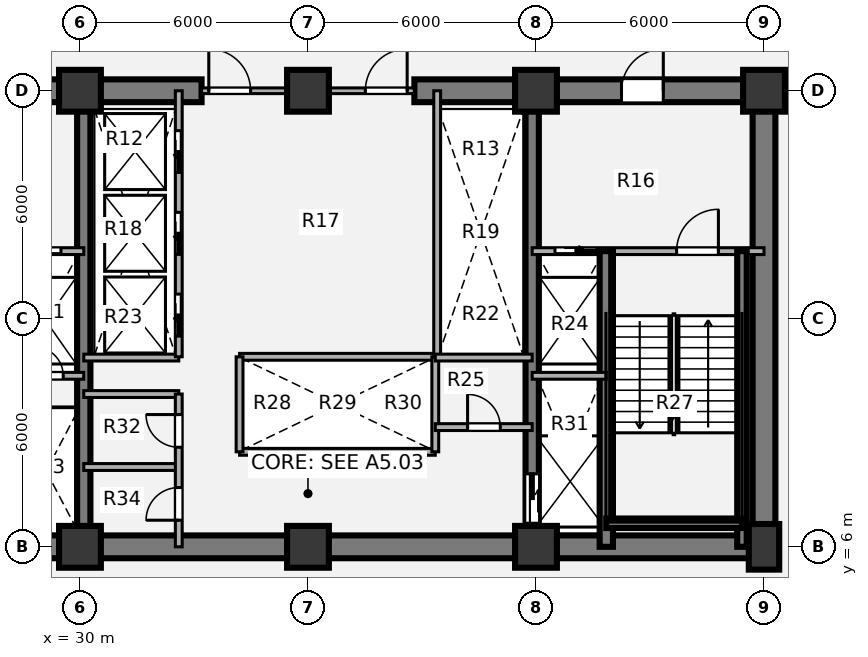
"""IFC4 building model, lengths in metres.
Left out: names, types, materials, properties, quantities, classifications, styles, units other than length and angle.
Written with IfcOpenShell. Run it as: python <this file> out.ifc"""

import sys

from ifc_helpers import new_model, si_unit, direction, frame, frame_2d, origin, origin_2d, place, context, subcontext, project, spatial, rectangle, extrude, source, transform, mapped, element, fill, save


model = new_model("IFC4")
c1 = context("Model", 3, precision=1e-05, world=origin(), true_north=direction((0.0, 1.0)))
c2 = subcontext(c1, "Body", "Model", "MODEL_VIEW")
j1 = project(units=[si_unit("LENGTHUNIT", "METRE"), si_unit("PLANEANGLEUNIT", "RADIAN")], contexts=[c1])
p1 = place(None, origin())
s1 = spatial("IfcSite", under=j1, at=p1, CompositionType="ELEMENT")
p2 = place(p1, origin())
s2 = spatial("IfcBuilding", under=s1, at=p2, CompositionType="ELEMENT")
p3 = place(p2, frame((0.0, 0.0, 22.68)))
s3 = spatial("IfcBuildingStorey", under=s2, at=p3, CompositionType="ELEMENT", Elevation=22.68)
m1 = source(origin(), c2, "Body", "SweptSolid", [
    extrude(rectangle(XDim=1.1, YDim=1.1, at=origin_2d()), origin(), (0.0, 0.0, 1.0), 4.32),
])
for number, where, z_axis, x_axis in (
    (1, (30.0, 6.0, 0.0), (0.0, 0.0, 1.0), (1.0, 0.0, 0.0)),
    (2, (36.0, 6.0, 0.0), (0.0, 0.0, 1.0), (1.0, 0.0, 0.0)),
    (3, (42.0, 6.0, 0.0), (0.0, 0.0, 1.0), (1.0, 0.0, 0.0)),
):
    element("IfcColumn", number, at=place(p3, frame(where, z_axis=z_axis, x_axis=x_axis)), inside=s3, PredefinedType="COLUMN", context=c2, shape_type="MappedRepresentation", body=[
        mapped(m1, transform((0.0, 0.0, 0.0), x_axis=(1.0, 0.0, 0.0), y_axis=(0.0, 1.0, 0.0), z_axis=(0.0, 0.0, 1.0), scale=1.0)),
    ])
m2 = source(origin(), c2, "Body", "SweptSolid", [
    extrude(rectangle(XDim=0.8, YDim=1.2, at=origin_2d()), origin(), (0.0, 0.0, 1.0), 4.32),
])
p4 = place(p3, frame((48.0, 6.0, 0.0), z_axis=(0.0, 0.0, 1.0), x_axis=(1.0, 0.0, 0.0)))
e4 = element("IfcColumn", 4, at=p4, inside=s3, PredefinedType="COLUMN", context=c2, shape_type="MappedRepresentation", body=[
    mapped(m2, transform((0.0, 0.0, 0.0), x_axis=(1.0, 0.0, 0.0), y_axis=(0.0, 1.0, 0.0), z_axis=(0.0, 0.0, 1.0), scale=1.0)),
])
for number, where, z_axis, x_axis in (
    (5, (30.0, 18.0, 0.0), (0.0, 0.0, 1.0), (1.0, 0.0, 0.0)),
    (6, (36.0, 18.0, 0.0), (0.0, 0.0, 1.0), (1.0, 0.0, 0.0)),
    (7, (42.0, 18.0, 0.0), (0.0, 0.0, 1.0), (1.0, 0.0, 0.0)),
    (8, (48.0, 18.0, 0.0), (0.0, 0.0, 1.0), (1.0, 0.0, 0.0)),
):
    element("IfcColumn", number, at=place(p3, frame(where, z_axis=z_axis, x_axis=x_axis)), inside=s3, PredefinedType="COLUMN", context=c2, shape_type="MappedRepresentation", body=[
        mapped(m1, transform((0.0, 0.0, 0.0), x_axis=(1.0, 0.0, 0.0), y_axis=(0.0, 1.0, 0.0), z_axis=(0.0, 0.0, 1.0), scale=1.0)),
    ])
p5 = place(p3, frame((48.3, 6.0, 0.0), z_axis=(0.0, 0.0, 1.0), x_axis=(-1.0, 0.0, 0.0)))
e9 = element("IfcWall", 9, at=p5, inside=s3, PredefinedType="SHEAR", context=c2, shape_type="SweptSolid", body=[
    extrude(rectangle(XDim=24.6, YDim=0.6, at=frame_2d((12.3, 0.0))), origin(), (0.0, 0.0, 1.0), 4.32),
])
p6 = place(p3, frame((48.0, 18.0, 0.0), z_axis=(0.0, 0.0, 1.0), x_axis=(0.0, -1.0, 0.0)))
e10 = element("IfcWall", 10, at=p6, inside=s3, PredefinedType="SHEAR", context=c2, shape_type="SweptSolid", body=[
    extrude(rectangle(XDim=12.0, YDim=0.6, at=frame_2d((6.0, 0.0))), origin(), (0.0, 0.0, 1.0), 4.32),
])
p7 = place(p3, frame((23.7, 18.0, 0.0), z_axis=(0.0, 0.0, 1.0), x_axis=(1.0, 0.0, 0.0)))
e11 = element("IfcWall", 11, at=p7, inside=s3, PredefinedType="SHEAR", context=c2, shape_type="SweptSolid", body=[
    extrude(rectangle(XDim=9.5, YDim=0.6, at=frame_2d((4.75, 0.0))), origin(), (0.0, 0.0, 1.0), 4.32),
])
p8 = place(p7, frame((2.95, 0.0, 0.0)))
e12 = element("IfcOpeningElement", 12, at=p8, cuts=e11, PredefinedType="OPENING", context=c2, shape_type="SweptSolid", body=[
    extrude(rectangle(XDim=1.1, YDim=2.1, at=origin_2d()), frame((0.55, 0.31, 1.05), z_axis=(0.0, -1.0, 0.0), x_axis=(1.0, 0.0, 0.0)), (0.0, 0.0, 1.0), 0.62),
])
p9 = place(p3, frame((38.8, 18.0, 0.0), z_axis=(0.0, 0.0, 1.0), x_axis=(1.0, 0.0, 0.0)))
e13 = element("IfcWall", 13, at=p9, inside=s3, PredefinedType="SHEAR", context=c2, shape_type="SweptSolid", body=[
    extrude(rectangle(XDim=9.5, YDim=0.6, at=frame_2d((4.75, 0.0))), origin(), (0.0, 0.0, 1.0), 4.32),
])
p10 = place(p9, frame((5.45, 0.0, 0.0)))
e14 = element("IfcOpeningElement", 14, at=p10, cuts=e13, PredefinedType="OPENING", context=c2, shape_type="SweptSolid", body=[
    extrude(rectangle(XDim=1.1, YDim=2.1, at=origin_2d()), frame((0.55, 0.31, 1.05), z_axis=(0.0, -1.0, 0.0), x_axis=(1.0, 0.0, 0.0)), (0.0, 0.0, 1.0), 0.62),
])
p11 = place(p3, frame((30.1, 6.0, 0.0), z_axis=(0.0, 0.0, 1.0), x_axis=(0.0, 1.0, 0.0)))
e15 = element("IfcWall", 15, at=p11, inside=s3, PredefinedType="SHEAR", context=c2, shape_type="SweptSolid", body=[
    extrude(rectangle(XDim=12.0, YDim=0.35, at=frame_2d((6.0, 0.0))), origin(), (0.0, 0.0, 1.0), 4.32),
])
p12 = place(p3, frame((41.9, 18.0, 0.0), z_axis=(0.0, 0.0, 1.0), x_axis=(0.0, -1.0, 0.0)))
e16 = element("IfcWall", 16, at=p12, inside=s3, PredefinedType="SHEAR", context=c2, shape_type="SweptSolid", body=[
    extrude(rectangle(XDim=12.0, YDim=0.35, at=frame_2d((6.0, 0.0))), origin(), (0.0, 0.0, 1.0), 4.32),
])
p13 = place(p12, frame((10.08, 0.0, 0.0)))
e17 = element("IfcOpeningElement", 17, at=p13, cuts=e16, PredefinedType="OPENING", context=c2, shape_type="SweptSolid", body=[
    extrude(rectangle(XDim=1.3, YDim=2.1, at=origin_2d()), frame((0.65, 0.185, 1.05), z_axis=(0.0, -1.0, 0.0), x_axis=(1.0, 0.0, 0.0)), (0.0, 0.0, 1.0), 0.37),
])
for number, where, z_axis, x_axis in (
    (18, (34.2, 11.0, 0.0), (0.0, 0.0, 1.0), (1.0, 0.0, 0.0)),
    (19, (34.2, 8.5, 0.0), (0.0, 0.0, 1.0), (1.0, 0.0, 0.0)),
):
    element("IfcWall", number, at=place(p3, frame(where, z_axis=z_axis, x_axis=x_axis)), inside=s3, PredefinedType="PARTITIONING", context=c2, shape_type="SweptSolid", body=[
        extrude(rectangle(XDim=5.15, YDim=0.18, at=frame_2d((2.575, 0.0))), origin(), (0.0, 0.0, 1.0), 3.97),
    ])
for number, where, z_axis, x_axis in (
    (20, (34.2, 8.5, 0.0), (0.0, 0.0, 1.0), (0.0, 1.0, 0.0)),
    (21, (39.35, 8.5, 0.0), (0.0, 0.0, 1.0), (0.0, 1.0, 0.0)),
):
    element("IfcWall", number, at=place(p3, frame(where, z_axis=z_axis, x_axis=x_axis)), inside=s3, PredefinedType="PARTITIONING", context=c2, shape_type="SweptSolid", body=[
        extrude(rectangle(XDim=2.5, YDim=0.18, at=frame_2d((1.25, 0.0))), origin(), (0.0, 0.0, 1.0), 3.97),
    ])
p14 = place(p3, frame((39.4, 11.0, 0.0), z_axis=(0.0, 0.0, 1.0), x_axis=(0.0, 1.0, 0.0)))
e22 = element("IfcWall", 22, at=p14, inside=s3, PredefinedType="PARTITIONING", context=c2, shape_type="SweptSolid", body=[
    extrude(rectangle(XDim=7.0, YDim=0.18, at=frame_2d((3.5, 0.0))), origin(), (0.0, 0.0, 1.0), 3.97),
])
p15 = place(p3, frame((30.1, 10.98, 0.0), z_axis=(0.0, 0.0, 1.0), x_axis=(1.0, 0.0, 0.0)))
e23 = element("IfcWall", 23, at=p15, inside=s3, PredefinedType="PARTITIONING", context=c2, shape_type="SweptSolid", body=[
    extrude(rectangle(XDim=2.5, YDim=0.18, at=frame_2d((1.25, 0.0))), origin(), (0.0, 0.0, 1.0), 3.97),
])
p16 = place(p3, frame((39.35, 10.98, 0.0), z_axis=(0.0, 0.0, 1.0), x_axis=(1.0, 0.0, 0.0)))
e24 = element("IfcWall", 24, at=p16, inside=s3, PredefinedType="PARTITIONING", context=c2, shape_type="SweptSolid", body=[
    extrude(rectangle(XDim=2.55, YDim=0.18, at=frame_2d((1.275, 0.0))), origin(), (0.0, 0.0, 1.0), 3.97),
])
for number, where, z_axis, x_axis in (
    (25, (30.1, 8.1, 0.0), (0.0, 0.0, 1.0), (1.0, 0.0, 0.0)),
    (26, (30.1, 10.02, 0.0), (0.0, 0.0, 1.0), (1.0, 0.0, 0.0)),
):
    element("IfcWall", number, at=place(p3, frame(where, z_axis=z_axis, x_axis=x_axis)), inside=s3, PredefinedType="PARTITIONING", context=c2, shape_type="SweptSolid", body=[
        extrude(rectangle(XDim=2.5, YDim=0.18, at=frame_2d((1.25, 0.0))), origin(), (0.0, 0.0, 1.0), 3.97),
    ])
p17 = place(p3, frame((32.6, 6.0, 0.0), z_axis=(0.0, 0.0, 1.0), x_axis=(0.0, 1.0, 0.0)))
e27 = element("IfcWall", 27, at=p17, inside=s3, PredefinedType="PARTITIONING", context=c2, shape_type="SweptSolid", body=[
    extrude(rectangle(XDim=4.02, YDim=0.18, at=frame_2d((2.01, 0.0))), origin(), (0.0, 0.0, 1.0), 3.97),
])
p18 = place(p17, frame((0.7, 0.0, 0.0)))
e28 = element("IfcOpeningElement", 28, at=p18, cuts=e27, PredefinedType="OPENING", context=c2, shape_type="SweptSolid", body=[
    extrude(rectangle(XDim=0.86, YDim=2.1, at=origin_2d()), frame((0.43, 0.1, 1.05), z_axis=(0.0, -1.0, 0.0), x_axis=(1.0, 0.0, 0.0)), (0.0, 0.0, 1.0), 0.2),
])
p19 = place(p17, frame((2.62, 0.0, 0.0)))
e29 = element("IfcOpeningElement", 29, at=p19, cuts=e27, PredefinedType="OPENING", context=c2, shape_type="SweptSolid", body=[
    extrude(rectangle(XDim=0.86, YDim=2.1, at=origin_2d()), frame((0.43, 0.1, 1.05), z_axis=(0.0, -1.0, 0.0), x_axis=(1.0, 0.0, 0.0)), (0.0, 0.0, 1.0), 0.2),
])
p20 = place(p3, frame((39.35, 9.15, 0.0), z_axis=(0.0, 0.0, 1.0), x_axis=(1.0, 0.0, 0.0)))
e30 = element("IfcWall", 30, at=p20, inside=s3, PredefinedType="PARTITIONING", context=c2, shape_type="SweptSolid", body=[
    extrude(rectangle(XDim=2.55, YDim=0.18, at=frame_2d((1.275, 0.0))), origin(), (0.0, 0.0, 1.0), 3.97),
])
p21 = place(p20, frame((0.85, 0.0, 0.0)))
e31 = element("IfcOpeningElement", 31, at=p21, cuts=e30, PredefinedType="OPENING", context=c2, shape_type="SweptSolid", body=[
    extrude(rectangle(XDim=0.86, YDim=2.1, at=origin_2d()), frame((0.43, 0.1, 1.05), z_axis=(0.0, -1.0, 0.0), x_axis=(1.0, 0.0, 0.0)), (0.0, 0.0, 1.0), 0.2),
])
p22 = place(p3, frame((33.2, 18.0, 0.0), z_axis=(0.0, 0.0, 1.0), x_axis=(1.0, 0.0, 0.0)))
e32 = element("IfcWall", 32, at=p22, inside=s3, PredefinedType="PARTITIONING", context=c2, shape_type="SweptSolid", body=[
    extrude(rectangle(XDim=5.6, YDim=0.15, at=frame_2d((2.8, 0.0))), origin(), (0.0, 0.0, 1.0), 2.785),
])
p23 = place(p22, frame((0.19, 0.0, 0.0)))
e33 = element("IfcOpeningElement", 33, at=p23, cuts=e32, PredefinedType="OPENING", context=c2, shape_type="SweptSolid", body=[
    extrude(rectangle(XDim=1.1, YDim=2.1, at=origin_2d()), frame((0.55, 0.085, 1.05), z_axis=(0.0, -1.0, 0.0), x_axis=(1.0, 0.0, 0.0)), (0.0, 0.0, 1.0), 0.17),
])
p24 = place(p22, frame((4.31, 0.0, 0.0)))
e34 = element("IfcOpeningElement", 34, at=p24, cuts=e32, PredefinedType="OPENING", context=c2, shape_type="SweptSolid", body=[
    extrude(rectangle(XDim=1.1, YDim=2.1, at=origin_2d()), frame((0.55, 0.085, 1.05), z_axis=(0.0, -1.0, 0.0), x_axis=(1.0, 0.0, 0.0)), (0.0, 0.0, 1.0), 0.17),
])
p25 = place(p3, frame((24.0, 13.78, 0.0), z_axis=(0.0, 0.0, 1.0), x_axis=(1.0, 0.0, 0.0)))
e35 = element("IfcWall", 35, at=p25, inside=s3, PredefinedType="PARTITIONING", context=c2, shape_type="SweptSolid", body=[
    extrude(rectangle(XDim=6.1, YDim=0.18, at=frame_2d((3.05, 0.0))), origin(), (0.0, 0.0, 1.0), 3.97),
])
p26 = place(p25, frame((1.15, 0.0, 0.0)))
e36 = element("IfcOpeningElement", 36, at=p26, cuts=e35, PredefinedType="OPENING", context=c2, shape_type="SweptSolid", body=[
    extrude(rectangle(XDim=1.1, YDim=2.1, at=origin_2d()), frame((0.55, 0.1, 1.05), z_axis=(0.0, -1.0, 0.0), x_axis=(1.0, 0.0, 0.0)), (0.0, 0.0, 1.0), 0.2),
])
p27 = place(p25, frame((4.4, 0.0, 0.0)))
e37 = element("IfcOpeningElement", 37, at=p27, cuts=e35, PredefinedType="OPENING", context=c2, shape_type="SweptSolid", body=[
    extrude(rectangle(XDim=1.1, YDim=2.1, at=origin_2d()), frame((0.55, 0.1, 1.05), z_axis=(0.0, -1.0, 0.0), x_axis=(1.0, 0.0, 0.0)), (0.0, 0.0, 1.0), 0.2),
])
p28 = place(p3, frame((28.15, 10.5, 0.0), z_axis=(0.0, 0.0, 1.0), x_axis=(1.0, 0.0, 0.0)))
e38 = element("IfcWall", 38, at=p28, inside=s3, PredefinedType="PARTITIONING", context=c2, shape_type="SweptSolid", body=[
    extrude(rectangle(XDim=1.95, YDim=0.18, at=frame_2d((0.975, 0.0))), origin(), (0.0, 0.0, 1.0), 3.97),
])
p29 = place(p28, frame((0.65, 0.0, 0.0)))
e39 = element("IfcOpeningElement", 39, at=p29, cuts=e38, PredefinedType="OPENING", context=c2, shape_type="SweptSolid", body=[
    extrude(rectangle(XDim=0.76, YDim=2.05, at=origin_2d()), frame((0.38, 0.1, 1.025), z_axis=(0.0, -1.0, 0.0), x_axis=(1.0, 0.0, 0.0)), (0.0, 0.0, 1.0), 0.2),
])
p30 = place(p3, frame((41.9, 13.78, 0.0), z_axis=(0.0, 0.0, 1.0), x_axis=(1.0, 0.0, 0.0)))
e40 = element("IfcWall", 40, at=p30, inside=s3, PredefinedType="PARTITIONING", context=c2, shape_type="SweptSolid", body=[
    extrude(rectangle(XDim=6.1, YDim=0.18, at=frame_2d((3.05, 0.0))), origin(), (0.0, 0.0, 1.0), 3.97),
])
p31 = place(p30, frame((0.6, 0.0, 0.0)))
e41 = element("IfcOpeningElement", 41, at=p31, cuts=e40, PredefinedType="OPENING", context=c2, shape_type="SweptSolid", body=[
    extrude(rectangle(XDim=1.1, YDim=2.1, at=origin_2d()), frame((0.55, 0.1, 1.05), z_axis=(0.0, -1.0, 0.0), x_axis=(1.0, 0.0, 0.0)), (0.0, 0.0, 1.0), 0.2),
])
p32 = place(p30, frame((3.8, 0.0, 0.0)))
e42 = element("IfcOpeningElement", 42, at=p32, cuts=e40, PredefinedType="OPENING", context=c2, shape_type="SweptSolid", body=[
    extrude(rectangle(XDim=1.1, YDim=2.1, at=origin_2d()), frame((0.55, 0.1, 1.05), z_axis=(0.0, -1.0, 0.0), x_axis=(1.0, 0.0, 0.0)), (0.0, 0.0, 1.0), 0.2),
])
p33 = place(p3, frame((43.85, 6.0, 0.0), z_axis=(0.0, 0.0, 1.0), x_axis=(0.0, 1.0, 0.0)))
e43 = element("IfcWall", 43, at=p33, inside=s3, PredefinedType="SHEAR", context=c2, shape_type="SweptSolid", body=[
    extrude(rectangle(XDim=7.78, YDim=0.35, at=frame_2d((3.89, 0.0))), origin(), (0.0, 0.0, 1.0), 4.32),
])
p34 = place(p3, frame((47.42, 6.0, 0.0), z_axis=(0.0, 0.0, 1.0), x_axis=(0.0, 1.0, 0.0)))
e44 = element("IfcWall", 44, at=p34, inside=s3, PredefinedType="SHEAR", context=c2, shape_type="SweptSolid", body=[
    extrude(rectangle(XDim=7.78, YDim=0.25, at=frame_2d((3.89, 0.0))), origin(), (0.0, 0.0, 1.0), 4.32),
])
p35 = place(p3, frame((43.85, 6.62, 0.0), z_axis=(0.0, 0.0, 1.0), x_axis=(1.0, 0.0, 0.0)))
e45 = element("IfcWall", 45, at=p35, inside=s3, PredefinedType="SHEAR", context=c2, shape_type="SweptSolid", body=[
    extrude(rectangle(XDim=3.57, YDim=0.25, at=frame_2d((1.785, 0.0))), origin(), (0.0, 0.0, 1.0), 4.32),
])
p36 = place(p3, frame((41.9, 10.5, 0.0), z_axis=(0.0, 0.0, 1.0), x_axis=(1.0, 0.0, 0.0)))
e46 = element("IfcWall", 46, at=p36, inside=s3, PredefinedType="PARTITIONING", context=c2, shape_type="SweptSolid", body=[
    extrude(rectangle(XDim=1.95, YDim=0.18, at=frame_2d((0.975, 0.0))), origin(), (0.0, 0.0, 1.0), 3.97),
])
p37 = place(p3, frame((32.6, 11.0, 0.0), z_axis=(0.0, 0.0, 1.0), x_axis=(0.0, 1.0, 0.0)))
e47 = element("IfcWall", 47, at=p37, inside=s3, PredefinedType="PARTITIONING", context=c2, shape_type="SweptSolid", body=[
    extrude(rectangle(XDim=7.0, YDim=0.18, at=frame_2d((3.5, 0.0))), origin(), (0.0, 0.0, 1.0), 3.97),
])
p38 = place(p37, frame((0.55, 0.0, 0.0)))
e48 = element("IfcOpeningElement", 48, at=p38, cuts=e47, PredefinedType="OPENING", context=c2, shape_type="SweptSolid", body=[
    extrude(rectangle(XDim=1.1, YDim=2.1, at=origin_2d()), frame((0.55, 0.1, 1.05), z_axis=(0.0, -1.0, 0.0), x_axis=(1.0, 0.0, 0.0)), (0.0, 0.0, 1.0), 0.2),
])
p39 = place(p37, frame((2.7, 0.0, 0.0)))
e49 = element("IfcOpeningElement", 49, at=p39, cuts=e47, PredefinedType="OPENING", context=c2, shape_type="SweptSolid", body=[
    extrude(rectangle(XDim=1.1, YDim=2.1, at=origin_2d()), frame((0.55, 0.1, 1.05), z_axis=(0.0, -1.0, 0.0), x_axis=(1.0, 0.0, 0.0)), (0.0, 0.0, 1.0), 0.2),
])
p40 = place(p37, frame((4.85, 0.0, 0.0)))
e50 = element("IfcOpeningElement", 50, at=p40, cuts=e47, PredefinedType="OPENING", context=c2, shape_type="SweptSolid", body=[
    extrude(rectangle(XDim=1.1, YDim=2.1, at=origin_2d()), frame((0.55, 0.1, 1.05), z_axis=(0.0, -1.0, 0.0), x_axis=(1.0, 0.0, 0.0)), (0.0, 0.0, 1.0), 0.2),
])
m3 = source(origin(), c2, "Body", "SweptSolid", [
    extrude(rectangle(XDim=0.86, YDim=2.1, at=origin_2d()), frame((0.43, 0.025, 1.05), z_axis=(0.0, -1.0, 0.0), x_axis=(1.0, 0.0, 0.0)), (0.0, 0.0, 1.0), 0.05),
])
p41 = place(p18, origin())
e51 = element("IfcDoor", 51, at=p41, inside=s3, OperationType="SINGLE_SWING_LEFT", PredefinedType="DOOR", context=c2, shape_type="MappedRepresentation", body=[
    mapped(m3, transform((0.0, 0.0, 0.0), x_axis=(1.0, 0.0, 0.0), y_axis=(0.0, 1.0, 0.0), z_axis=(0.0, 0.0, 1.0), scale=1.0)),
])
fill(e28, e51)
p42 = place(p19, origin())
e52 = element("IfcDoor", 52, at=p42, inside=s3, OperationType="SINGLE_SWING_RIGHT", PredefinedType="DOOR", context=c2, shape_type="MappedRepresentation", body=[
    mapped(m3, transform((0.0, 0.0, 0.0), x_axis=(1.0, 0.0, 0.0), y_axis=(0.0, 1.0, 0.0), z_axis=(0.0, 0.0, 1.0), scale=1.0)),
])
fill(e29, e52)
p43 = place(p21, origin())
e53 = element("IfcDoor", 53, at=p43, inside=s3, OperationType="SINGLE_SWING_LEFT", PredefinedType="DOOR", context=c2, shape_type="MappedRepresentation", body=[
    mapped(m3, transform((0.0, 0.0, 0.0), x_axis=(1.0, 0.0, 0.0), y_axis=(0.0, 1.0, 0.0), z_axis=(0.0, 0.0, 1.0), scale=1.0)),
])
fill(e31, e53)
m4 = source(origin(), c2, "Body", "SweptSolid", [
    extrude(rectangle(XDim=1.1, YDim=2.1, at=origin_2d()), frame((0.55, 0.025, 1.05), z_axis=(0.0, -1.0, 0.0), x_axis=(1.0, 0.0, 0.0)), (0.0, 0.0, 1.0), 0.05),
])
p44 = place(p23, origin())
e54 = element("IfcDoor", 54, at=p44, inside=s3, OperationType="SINGLE_SWING_LEFT", PredefinedType="DOOR", context=c2, shape_type="MappedRepresentation", body=[
    mapped(m4, transform((0.0, 0.0, 0.0), x_axis=(1.0, 0.0, 0.0), y_axis=(0.0, 1.0, 0.0), z_axis=(0.0, 0.0, 1.0), scale=1.0)),
])
fill(e33, e54)
p45 = place(p24, origin())
e55 = element("IfcDoor", 55, at=p45, inside=s3, OperationType="SINGLE_SWING_RIGHT", PredefinedType="DOOR", context=c2, shape_type="MappedRepresentation", body=[
    mapped(m4, transform((0.0, 0.0, 0.0), x_axis=(1.0, 0.0, 0.0), y_axis=(0.0, 1.0, 0.0), z_axis=(0.0, 0.0, 1.0), scale=1.0)),
])
fill(e34, e55)
m5 = source(origin(), c2, "Body", "SweptSolid", [
    extrude(rectangle(XDim=1.1, YDim=2.1, at=origin_2d()), frame((0.55, 0.025, 1.05), z_axis=(0.0, -1.0, 0.0), x_axis=(1.0, 0.0, 0.0)), (0.0, 0.0, 1.0), 0.05),
])
p46 = place(p27, origin())
e56 = element("IfcDoor", 56, at=p46, inside=s3, OperationType="SLIDING_TO_LEFT", PredefinedType="DOOR", context=c2, shape_type="MappedRepresentation", body=[
    mapped(m5, transform((0.0, 0.0, 0.0), x_axis=(1.0, 0.0, 0.0), y_axis=(0.0, 1.0, 0.0), z_axis=(0.0, 0.0, 1.0), scale=1.0)),
])
fill(e37, e56)
m6 = source(origin(), c2, "Body", "SweptSolid", [
    extrude(rectangle(XDim=0.76, YDim=2.05, at=origin_2d()), frame((0.38, 0.025, 1.025), z_axis=(0.0, -1.0, 0.0), x_axis=(1.0, 0.0, 0.0)), (0.0, 0.0, 1.0), 0.05),
])
p47 = place(p29, origin())
e57 = element("IfcDoor", 57, at=p47, inside=s3, OperationType="SINGLE_SWING_LEFT", PredefinedType="DOOR", context=c2, shape_type="MappedRepresentation", body=[
    mapped(m6, transform((0.0, 0.0, 0.0), x_axis=(1.0, 0.0, 0.0), y_axis=(0.0, 1.0, 0.0), z_axis=(0.0, 0.0, 1.0), scale=1.0)),
])
fill(e39, e57)
p48 = place(p31, origin())
e58 = element("IfcDoor", 58, at=p48, inside=s3, OperationType="SLIDING_TO_RIGHT", PredefinedType="DOOR", context=c2, shape_type="MappedRepresentation", body=[
    mapped(m5, transform((0.0, 0.0, 0.0), x_axis=(1.0, 0.0, 0.0), y_axis=(0.0, 1.0, 0.0), z_axis=(0.0, 0.0, 1.0), scale=1.0)),
])
fill(e41, e58)
m7 = source(origin(), c2, "Body", "SweptSolid", [
    extrude(rectangle(XDim=1.1, YDim=2.1, at=origin_2d()), frame((0.55, 0.025, 1.05), z_axis=(0.0, -1.0, 0.0), x_axis=(1.0, 0.0, 0.0)), (0.0, 0.0, 1.0), 0.05),
])
p49 = place(p32, origin())
e59 = element("IfcDoor", 59, at=p49, inside=s3, OperationType="SINGLE_SWING_RIGHT", PredefinedType="DOOR", context=c2, shape_type="MappedRepresentation", body=[
    mapped(m7, transform((0.0, 0.0, 0.0), x_axis=(1.0, 0.0, 0.0), y_axis=(0.0, 1.0, 0.0), z_axis=(0.0, 0.0, 1.0), scale=1.0)),
])
fill(e42, e59)
m8 = source(origin(), c2, "Body", "SweptSolid", [
    extrude(rectangle(XDim=1.3, YDim=2.1, at=origin_2d()), frame((0.65, 0.025, 1.05), z_axis=(0.0, -1.0, 0.0), x_axis=(1.0, 0.0, 0.0)), (0.0, 0.0, 1.0), 0.05),
])
p50 = place(p13, origin())
e60 = element("IfcDoor", 60, at=p50, inside=s3, OperationType="SLIDING_TO_LEFT", PredefinedType="DOOR", context=c2, shape_type="MappedRepresentation", body=[
    mapped(m8, transform((0.0, 0.0, 0.0), x_axis=(1.0, 0.0, 0.0), y_axis=(0.0, 1.0, 0.0), z_axis=(0.0, 0.0, 1.0), scale=1.0)),
])
fill(e17, e60)
p51 = place(p10, origin())
e61 = element("IfcDoor", 61, at=p51, inside=s3, OperationType="SINGLE_SWING_RIGHT", PredefinedType="DOOR", context=c2, shape_type="MappedRepresentation", body=[
    mapped(m4, transform((0.0, 0.0, 0.0), x_axis=(1.0, 0.0, 0.0), y_axis=(0.0, 1.0, 0.0), z_axis=(0.0, 0.0, 1.0), scale=1.0)),
])
fill(e14, e61)
p52 = place(p38, origin())
e62 = element("IfcDoor", 62, at=p52, inside=s3, OperationType="SLIDING_TO_LEFT", PredefinedType="DOOR", context=c2, shape_type="MappedRepresentation", body=[
    mapped(m5, transform((0.0, 0.0, 0.0), x_axis=(1.0, 0.0, 0.0), y_axis=(0.0, 1.0, 0.0), z_axis=(0.0, 0.0, 1.0), scale=1.0)),
])
fill(e48, e62)
p53 = place(p39, origin())
e63 = element("IfcDoor", 63, at=p53, inside=s3, OperationType="SLIDING_TO_LEFT", PredefinedType="DOOR", context=c2, shape_type="MappedRepresentation", body=[
    mapped(m5, transform((0.0, 0.0, 0.0), x_axis=(1.0, 0.0, 0.0), y_axis=(0.0, 1.0, 0.0), z_axis=(0.0, 0.0, 1.0), scale=1.0)),
])
fill(e49, e63)
p54 = place(p40, origin())
e64 = element("IfcDoor", 64, at=p54, inside=s3, OperationType="SLIDING_TO_LEFT", PredefinedType="DOOR", context=c2, shape_type="MappedRepresentation", body=[
    mapped(m5, transform((0.0, 0.0, 0.0), x_axis=(1.0, 0.0, 0.0), y_axis=(0.0, 1.0, 0.0), z_axis=(0.0, 0.0, 1.0), scale=1.0)),
])
fill(e50, e64)
save(model, sys.argv[1])
